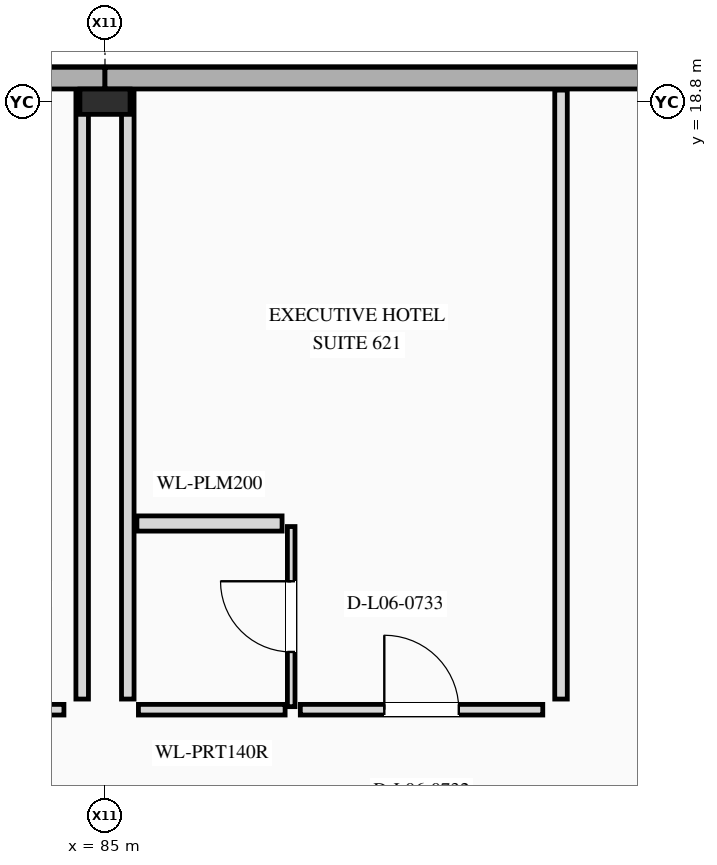
"""IFC4 building model, lengths in metres.
Left out: names, types, materials, properties, quantities, classifications, styles, units other than length and angle.
Written with IfcOpenShell. Run it as: python <this file> out.ifc"""

import sys

from ifc_helpers import new_model, si_unit, direction, frame, frame_2d, origin, origin_2d, place, context, subcontext, project, spatial, rectangle, i_section, extrude, element, fill, save


model = new_model("IFC4")
c1 = context("Model", 3, precision=1e-05, world=origin(), true_north=direction((0.0, 1.0)))
c2 = subcontext(c1, "Body", "Model", "MODEL_VIEW")
j1 = project(units=[si_unit("LENGTHUNIT", "METRE"), si_unit("PLANEANGLEUNIT", "RADIAN")], contexts=[c1])
p1 = place(None, origin())
s1 = spatial("IfcSite", under=j1, at=p1, CompositionType="ELEMENT")
p2 = place(p1, origin())
s2 = spatial("IfcBuilding", under=s1, at=p2, CompositionType="ELEMENT")
p3 = place(p2, frame((0.0, 0.0, 27.0)))
s3 = spatial("IfcBuildingStorey", under=s2, at=p3, CompositionType="ELEMENT", Elevation=27.0)
p4 = place(p3, frame((85.0, 18.8, 0.0), z_axis=(0.0, 0.0, 1.0), x_axis=(0.0, 1.0, 0.0)))
e1 = element("IfcColumn", 1, at=p4, inside=s3, PredefinedType="COLUMN", context=c2, shape_type="SweptSolid", body=[
    extrude(i_section(OverallWidth=0.333, OverallDepth=0.66, WebThickness=0.024, FlangeThickness=0.044, at=origin_2d()), origin(), (0.0, 0.0, 1.0), 3.6),
])
p5 = place(p3, frame((85.0, 19.11, 0.0), z_axis=(0.0, 0.0, 1.0), x_axis=(-1.0, 0.0, 0.0)))
e2 = element("IfcWall", 2, at=p5, inside=s3, PredefinedType="STANDARD", context=c2, shape_type="SweptSolid", body=[
    extrude(rectangle(XDim=9.0, YDim=0.285, at=frame_2d((4.5, 0.0))), origin(), (0.0, 0.0, 1.0), 3.6),
])
p6 = place(p5, frame((5.35, 0.0, 0.85)))
e3 = element("IfcOpeningElement", 3, at=p6, cuts=e2, PredefinedType="OPENING", context=c2, shape_type="SweptSolid", body=[
    extrude(rectangle(XDim=2.5, YDim=1.75, at=frame_2d((1.25, 0.875))), frame((0.0, 0.152, 0.0), z_axis=(0.0, -1.0, 0.0), x_axis=(1.0, 0.0, 0.0)), (0.0, 0.0, 1.0), 0.305),
])
p7 = place(p5, frame((1.55, 0.0, 0.85)))
e4 = element("IfcOpeningElement", 4, at=p7, cuts=e2, PredefinedType="OPENING", context=c2, shape_type="SweptSolid", body=[
    extrude(rectangle(XDim=1.7, YDim=1.6, at=frame_2d((0.85, 0.8))), frame((0.0, 0.152, 0.0), z_axis=(0.0, -1.0, 0.0), x_axis=(1.0, 0.0, 0.0)), (0.0, 0.0, 1.0), 0.305),
])
p8 = place(p3, frame((94.0, 19.11, 0.0), z_axis=(0.0, 0.0, 1.0), x_axis=(-1.0, 0.0, 0.0)))
e5 = element("IfcWall", 5, at=p8, inside=s3, PredefinedType="STANDARD", context=c2, shape_type="SweptSolid", body=[
    extrude(rectangle(XDim=9.0, YDim=0.285, at=frame_2d((4.5, 0.0))), origin(), (0.0, 0.0, 1.0), 3.6),
])
p9 = place(p3, frame((82.51, 10.8, 0.0), z_axis=(0.0, 0.0, 1.0), x_axis=(1.0, 0.0, 0.0)))
e6 = element("IfcWall", 6, at=p9, inside=s3, PredefinedType="PARTITIONING", context=c2, shape_type="SweptSolid", body=[
    extrude(rectangle(XDim=1.95, YDim=0.14, at=frame_2d((0.975, 0.0))), origin(), (0.0, 0.0, 1.0), 3.29),
])
p10 = place(p9, frame((0.44, 0.0, 0.0)))
e7 = element("IfcOpeningElement", 7, at=p10, cuts=e6, PredefinedType="OPENING", context=c2, shape_type="SweptSolid", body=[
    extrude(rectangle(XDim=1.07, YDim=2.4, at=frame_2d((0.535, 1.2))), frame((0.0, 0.08, 0.0), z_axis=(0.0, -1.0, 0.0), x_axis=(1.0, 0.0, 0.0)), (0.0, 0.0, 1.0), 0.16),
])
p11 = place(p3, frame((84.7, 10.94, 0.0), z_axis=(0.0, 0.0, 1.0), x_axis=(0.0, 1.0, 0.0)))
e8 = element("IfcWall", 8, at=p11, inside=s3, PredefinedType="PARTITIONING", context=c2, shape_type="SweptSolid", body=[
    extrude(rectangle(XDim=8.012, YDim=0.165, at=frame_2d((4.006, 0.0))), origin(), (0.0, 0.0, 1.0), 2.619),
])
p12 = place(p3, frame((85.44, 10.8, 0.0), z_axis=(0.0, 0.0, 1.0), x_axis=(1.0, 0.0, 0.0)))
e9 = element("IfcWall", 9, at=p12, inside=s3, PredefinedType="PARTITIONING", context=c2, shape_type="SweptSolid", body=[
    extrude(rectangle(XDim=1.93, YDim=0.14, at=frame_2d((0.965, 0.0))), origin(), (0.0, 0.0, 1.0), 3.29),
])
p13 = place(p3, frame((87.57, 10.8, 0.0), z_axis=(0.0, 0.0, 1.0), x_axis=(1.0, 0.0, 0.0)))
e10 = element("IfcWall", 10, at=p13, inside=s3, PredefinedType="PARTITIONING", context=c2, shape_type="SweptSolid", body=[
    extrude(rectangle(XDim=3.19, YDim=0.14, at=frame_2d((1.595, 0.0))), origin(), (0.0, 0.0, 1.0), 3.29),
])
p14 = place(p13, frame((1.105, 0.0, 0.0)))
e11 = element("IfcOpeningElement", 11, at=p14, cuts=e10, PredefinedType="OPENING", context=c2, shape_type="SweptSolid", body=[
    extrude(rectangle(XDim=0.98, YDim=2.2, at=frame_2d((0.49, 1.1))), frame((0.0, 0.08, 0.0), z_axis=(0.0, -1.0, 0.0), x_axis=(1.0, 0.0, 0.0)), (0.0, 0.0, 1.0), 0.16),
])
p15 = place(p3, frame((85.3, 10.94, 0.0), z_axis=(0.0, 0.0, 1.0), x_axis=(0.0, 1.0, 0.0)))
e12 = element("IfcWall", 12, at=p15, inside=s3, PredefinedType="PARTITIONING", context=c2, shape_type="SweptSolid", body=[
    extrude(rectangle(XDim=8.012, YDim=0.165, at=frame_2d((4.006, 0.0))), origin(), (0.0, 0.0, 1.0), 2.619),
])
p16 = place(p3, frame((91.0, 10.94, 0.0), z_axis=(0.0, 0.0, 1.0), x_axis=(0.0, 1.0, 0.0)))
e13 = element("IfcWall", 13, at=p16, inside=s3, PredefinedType="PARTITIONING", context=c2, shape_type="SweptSolid", body=[
    extrude(rectangle(XDim=8.012, YDim=0.165, at=frame_2d((4.006, 0.0))), origin(), (0.0, 0.0, 1.0), 3.29),
])
p17 = place(p3, frame((87.45, 10.84, 0.0), z_axis=(0.0, 0.0, 1.0), x_axis=(0.0, 1.0, 0.0)))
e14 = element("IfcWall", 14, at=p17, inside=s3, PredefinedType="PARTITIONING", context=c2, shape_type="SweptSolid", body=[
    extrude(rectangle(XDim=2.37, YDim=0.1, at=frame_2d((1.185, 0.0))), origin(), (0.0, 0.0, 1.0), 3.29),
])
p18 = place(p17, frame((0.72, 0.0, 0.0)))
e15 = element("IfcOpeningElement", 15, at=p18, cuts=e14, PredefinedType="OPENING", context=c2, shape_type="SweptSolid", body=[
    extrude(rectangle(XDim=0.93, YDim=2.14, at=frame_2d((0.465, 1.07))), frame((0.0, 0.06, 0.0), z_axis=(0.0, -1.0, 0.0), x_axis=(1.0, 0.0, 0.0)), (0.0, 0.0, 1.0), 0.12),
])
p19 = place(p3, frame((85.42, 13.25, 0.0), z_axis=(0.0, 0.0, 1.0), x_axis=(1.0, 0.0, 0.0)))
e16 = element("IfcWall", 16, at=p19, inside=s3, PredefinedType="PLUMBINGWALL", context=c2, shape_type="SweptSolid", body=[
    extrude(rectangle(XDim=1.91, YDim=0.2, at=frame_2d((0.955, 0.0))), origin(), (0.0, 0.0, 1.0), 3.29),
])
p20 = place(p14, origin())
e17 = element("IfcDoor", 17, at=p20, inside=s3, OperationType="SINGLE_SWING_LEFT", PredefinedType="DOOR", context=c2, shape_type="SweptSolid", body=[
    extrude(rectangle(XDim=0.98, YDim=2.2, at=frame_2d((0.49, 1.1))), frame((0.0, 0.025, 0.0), z_axis=(0.0, -1.0, 0.0), x_axis=(1.0, 0.0, 0.0)), (0.0, 0.0, 1.0), 0.05),
])
fill(e11, e17)
p21 = place(p18, origin())
e18 = element("IfcDoor", 18, at=p21, inside=s3, OperationType="SINGLE_SWING_RIGHT", PredefinedType="DOOR", context=c2, shape_type="SweptSolid", body=[
    extrude(rectangle(XDim=0.93, YDim=2.14, at=frame_2d((0.465, 1.07))), frame((0.0, 0.025, 0.0), z_axis=(0.0, -1.0, 0.0), x_axis=(1.0, 0.0, 0.0)), (0.0, 0.0, 1.0), 0.05),
])
fill(e15, e18)
save(model, sys.argv[1])
